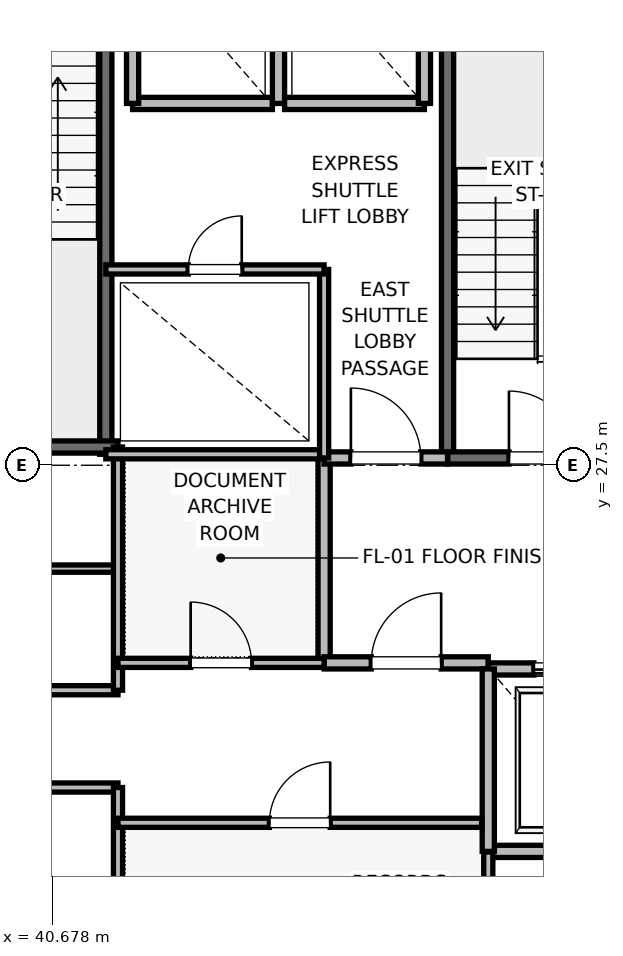
"""IFC4 building model, lengths in metres.
Left out: names, types, materials, properties, quantities, classifications, styles, units other than length and angle.
Written with IfcOpenShell. Run it as: python <this file> out.ifc"""

import sys

from ifc_helpers import new_model, si_unit, direction, frame, frame_2d, origin, place, context, subcontext, project, spatial, rectangle, extrude, element, fill, save


model = new_model("IFC4")
c1 = context("Model", 3, precision=1e-05, world=origin(), true_north=direction((0.0, 1.0)))
c2 = subcontext(c1, "Body", "Model", "MODEL_VIEW")
j1 = project(units=[si_unit("LENGTHUNIT", "METRE"), si_unit("PLANEANGLEUNIT", "RADIAN")], contexts=[c1])
p1 = place(None, origin())
s1 = spatial("IfcSite", under=j1, at=p1, CompositionType="ELEMENT")
p2 = place(p1, origin())
s2 = spatial("IfcBuilding", under=s1, at=p2, CompositionType="ELEMENT")
p3 = place(p2, frame((0.0, 0.0, 55.6)))
s3 = spatial("IfcBuildingStorey", under=s2, at=p3, CompositionType="ELEMENT", Elevation=55.6)
p4 = place(p3, frame((47.18, 27.62, 0.0), z_axis=(0.0, 0.0, 1.0), x_axis=(0.0, 1.0, 0.0)))
e1 = element("IfcWall", 1, at=p4, inside=s3, PredefinedType="SOLIDWALL", context=c2, shape_type="SweptSolid", body=[
    extrude(rectangle(XDim=8.18, YDim=0.2, at=frame_2d((4.09, 0.0))), origin(), (0.0, 0.0, 1.0), 3.76),
])
p5 = place(p3, frame((47.18, 27.62, 0.0), z_axis=(0.0, 0.0, 1.0), x_axis=(1.0, 0.0, 0.0)))
e2 = element("IfcWall", 2, at=p5, inside=s3, PredefinedType="SOLIDWALL", context=c2, shape_type="SweptSolid", body=[
    extrude(rectangle(XDim=3.12, YDim=0.2, at=frame_2d((1.56, 0.0))), origin(), (0.0, 0.0, 1.0), 3.76),
])
p6 = place(p5, frame((1.01, 0.0, 0.0)))
e3 = element("IfcOpeningElement", 3, at=p6, cuts=e2, PredefinedType="OPENING", context=c2, shape_type="SweptSolid", body=[
    extrude(rectangle(XDim=1.1, YDim=2.15, at=frame_2d((0.55, 1.075))), frame((0.0, 0.1, 0.0), z_axis=(0.0, -1.0, 0.0), x_axis=(1.0, 0.0, 0.0)), (0.0, 0.0, 1.0), 0.2),
])
p7 = place(p3, frame((41.56, 27.68, 0.0), z_axis=(0.0, 0.0, 1.0), x_axis=(0.0, 1.0, 0.0)))
e4 = element("IfcWall", 4, at=p7, inside=s3, PredefinedType="SOLIDWALL", context=c2, shape_type="SweptSolid", body=[
    extrude(rectangle(XDim=8.57, YDim=0.2, at=frame_2d((4.285, 0.0))), origin(), (0.0, 0.0, 1.0), 3.76),
])
p8 = place(p3, frame((38.44, 27.8, 0.0), z_axis=(0.0, 0.0, 1.0), x_axis=(1.0, 0.0, 0.0)))
e5 = element("IfcWall", 5, at=p8, inside=s3, PredefinedType="SOLIDWALL", context=c2, shape_type="SweptSolid", body=[
    extrude(rectangle(XDim=3.32, YDim=0.2, at=frame_2d((1.66, 0.0))), origin(), (0.0, 0.0, 1.0), 3.76),
])
p9 = place(p3, frame((45.15, 24.25, 0.0), z_axis=(0.0, 0.0, 1.0), x_axis=(0.0, 1.0, 0.0)))
e6 = element("IfcWall", 6, at=p9, inside=s3, PredefinedType="PARTITIONING", context=c2, shape_type="SweptSolid", body=[
    extrude(rectangle(XDim=3.37, YDim=0.2, at=frame_2d((1.685, 0.0))), origin(), (0.0, 0.0, 1.0), 3.76),
])
p10 = place(p3, frame((45.15, 24.25, 0.0), z_axis=(0.0, 0.0, 1.0), x_axis=(1.0, 0.0, 0.0)))
e7 = element("IfcWall", 7, at=p10, inside=s3, PredefinedType="PARTITIONING", context=c2, shape_type="SweptSolid", body=[
    extrude(rectangle(XDim=2.7, YDim=0.2, at=frame_2d((1.35, 0.0))), origin(), (0.0, 0.0, 1.0), 3.76),
])
p11 = place(p10, frame((0.775, 0.0, 0.0)))
e8 = element("IfcOpeningElement", 8, at=p11, cuts=e7, PredefinedType="OPENING", context=c2, shape_type="SweptSolid", body=[
    extrude(rectangle(XDim=1.15, YDim=2.2, at=frame_2d((0.575, 1.1))), frame((0.0, 0.1, 0.0), z_axis=(0.0, -1.0, 0.0), x_axis=(1.0, 0.0, 0.0)), (0.0, 0.0, 1.0), 0.2),
])
p12 = place(p3, frame((45.15, 27.62, 0.0), z_axis=(0.0, 0.0, 1.0), x_axis=(1.0, 0.0, 0.0)))
e9 = element("IfcWall", 9, at=p12, inside=s3, PredefinedType="PARTITIONING", context=c2, shape_type="SweptSolid", body=[
    extrude(rectangle(XDim=2.03, YDim=0.2, at=frame_2d((1.015, 0.0))), origin(), (0.0, 0.0, 1.0), 3.76),
])
p13 = place(p12, frame((0.44, 0.0, 0.0)))
e10 = element("IfcOpeningElement", 10, at=p13, cuts=e9, PredefinedType="OPENING", context=c2, shape_type="SweptSolid", body=[
    extrude(rectangle(XDim=1.15, YDim=2.2, at=frame_2d((0.575, 1.1))), frame((0.0, 0.1, 0.0), z_axis=(0.0, -1.0, 0.0), x_axis=(1.0, 0.0, 0.0)), (0.0, 0.0, 1.0), 0.2),
])
p14 = place(p3, frame((47.85, 21.15, 0.0), z_axis=(0.0, 0.0, 1.0), x_axis=(1.0, 0.0, 0.0)))
e11 = element("IfcWall", 11, at=p14, inside=s3, PredefinedType="SOLIDWALL", context=c2, shape_type="SweptSolid", body=[
    extrude(rectangle(XDim=2.6, YDim=0.2, at=frame_2d((1.3, 0.0))), origin(), (0.0, 0.0, 1.0), 3.76),
])
p15 = place(p3, frame((50.45, 24.15, 0.0), z_axis=(0.0, 0.0, 1.0), x_axis=(-1.0, 0.0, 0.0)))
e12 = element("IfcWall", 12, at=p15, inside=s3, PredefinedType="SOLIDWALL", context=c2, shape_type="SweptSolid", body=[
    extrude(rectangle(XDim=2.6, YDim=0.2, at=frame_2d((1.3, 0.0))), origin(), (0.0, 0.0, 1.0), 2.54),
])
p16 = place(p15, frame((0.75, 0.0, 0.0)))
e13 = element("IfcOpeningElement", 13, at=p16, cuts=e12, PredefinedType="OPENING", context=c2, shape_type="SweptSolid", body=[
    extrude(rectangle(XDim=1.1, YDim=2.2, at=frame_2d((0.55, 1.1))), frame((0.0, 0.1, 0.0), z_axis=(0.0, -1.0, 0.0), x_axis=(1.0, 0.0, 0.0)), (0.0, 0.0, 1.0), 0.2),
])
p17 = place(p3, frame((47.85, 24.15, 0.0), z_axis=(0.0, 0.0, 1.0), x_axis=(0.0, -1.0, 0.0)))
e14 = element("IfcWall", 14, at=p17, inside=s3, PredefinedType="SOLIDWALL", context=c2, shape_type="SweptSolid", body=[
    extrude(rectangle(XDim=3.0, YDim=0.2, at=frame_2d((1.5, 0.0))), origin(), (0.0, 0.0, 1.0), 3.76),
])
p18 = place(p3, frame((42.0, 33.45, 0.0), z_axis=(0.0, 0.0, 1.0), x_axis=(1.0, 0.0, 0.0)))
e15 = element("IfcWall", 15, at=p18, inside=s3, PredefinedType="SOLIDWALL", context=c2, shape_type="SweptSolid", body=[
    extrude(rectangle(XDim=2.3, YDim=0.2, at=frame_2d((1.15, 0.0))), origin(), (0.0, 0.0, 1.0), 3.76),
])
for number, where, z_axis, x_axis in (
    (16, (42.0, 36.05, 0.0), (0.0, 0.0, 1.0), (0.0, -1.0, 0.0)),
    (17, (44.4, 33.45, 0.0), (0.0, 0.0, 1.0), (0.0, 1.0, 0.0)),
):
    element("IfcWall", number, at=place(p3, frame(where, z_axis=z_axis, x_axis=x_axis)), inside=s3, PredefinedType="SOLIDWALL", context=c2, shape_type="SweptSolid", body=[
        extrude(rectangle(XDim=2.6, YDim=0.2, at=frame_2d((1.3, 0.0))), origin(), (0.0, 0.0, 1.0), 2.54),
    ])
p19 = place(p3, frame((44.5, 33.45, 0.0), z_axis=(0.0, 0.0, 1.0), x_axis=(1.0, 0.0, 0.0)))
e18 = element("IfcWall", 18, at=p19, inside=s3, PredefinedType="SOLIDWALL", context=c2, shape_type="SweptSolid", body=[
    extrude(rectangle(XDim=2.3, YDim=0.2, at=frame_2d((1.15, 0.0))), origin(), (0.0, 0.0, 1.0), 3.76),
])
p20 = place(p3, frame((46.8, 33.45, 0.0), z_axis=(0.0, 0.0, 1.0), x_axis=(0.0, 1.0, 0.0)))
e19 = element("IfcWall", 19, at=p20, inside=s3, PredefinedType="SOLIDWALL", context=c2, shape_type="SweptSolid", body=[
    extrude(rectangle(XDim=2.6, YDim=0.2, at=frame_2d((1.3, 0.0))), origin(), (0.0, 0.0, 1.0), 3.76),
])
for number, where, z_axis, x_axis in (
    (20, (39.95, 22.2, 0.0), (0.0, 0.0, 1.0), (1.0, 0.0, 0.0)),
    (21, (39.95, 23.8, 0.0), (0.0, 0.0, 1.0), (1.0, 0.0, 0.0)),
):
    element("IfcWall", number, at=place(p3, frame(where, z_axis=z_axis, x_axis=x_axis)), inside=s3, PredefinedType="PARTITIONING", context=c2, shape_type="SweptSolid", body=[
        extrude(rectangle(XDim=1.81, YDim=0.15, at=frame_2d((0.905, 0.0))), origin(), (0.0, 0.0, 1.0), 2.85),
    ])
p21 = place(p3, frame((39.95, 25.8, 0.0), z_axis=(0.0, 0.0, 1.0), x_axis=(1.0, 0.0, 0.0)))
e22 = element("IfcWall", 22, at=p21, inside=s3, PredefinedType="PARTITIONING", context=c2, shape_type="SweptSolid", body=[
    extrude(rectangle(XDim=1.81, YDim=0.12, at=frame_2d((0.905, 0.0))), origin(), (0.0, 0.0, 1.0), 2.85),
])
p22 = place(p3, frame((41.76, 18.6, 0.0), z_axis=(0.0, 0.0, 1.0), x_axis=(0.0, 1.0, 0.0)))
e23 = element("IfcWall", 23, at=p22, inside=s3, PredefinedType="PARTITIONING", context=c2, shape_type="SweptSolid", body=[
    extrude(rectangle(XDim=3.6, YDim=0.15, at=frame_2d((1.8, 0.0))), origin(), (0.0, 0.0, 1.0), 2.54),
])
p23 = place(p3, frame((41.76, 23.8, 0.0), z_axis=(0.0, 0.0, 1.0), x_axis=(0.0, 1.0, 0.0)))
e24 = element("IfcWall", 24, at=p23, inside=s3, PredefinedType="PARTITIONING", context=c2, shape_type="SweptSolid", body=[
    extrude(rectangle(XDim=4.0, YDim=0.15, at=frame_2d((2.0, 0.0))), origin(), (0.0, 0.0, 1.0), 2.85),
])
p24 = place(p3, frame((41.56, 27.68, 0.0), z_axis=(0.0, 0.0, 1.0), x_axis=(1.0, 0.0, 0.0)))
e25 = element("IfcWall", 25, at=p24, inside=s3, PredefinedType="PARTITIONING", context=c2, shape_type="SweptSolid", body=[
    extrude(rectangle(XDim=3.59, YDim=0.15, at=frame_2d((1.795, 0.0))), origin(), (0.0, 0.0, 1.0), 2.85),
])
p25 = place(p3, frame((47.85, 18.6, 0.0), z_axis=(0.0, 0.0, 1.0), x_axis=(0.0, 1.0, 0.0)))
e26 = element("IfcWall", 26, at=p25, inside=s3, PredefinedType="PARTITIONING", context=c2, shape_type="SweptSolid", body=[
    extrude(rectangle(XDim=2.54, YDim=0.15, at=frame_2d((1.27, 0.0))), origin(), (0.0, 0.0, 1.0), 2.85),
])
p26 = place(p3, frame((41.76, 21.62, 0.0), z_axis=(0.0, 0.0, 1.0), x_axis=(1.0, 0.0, 0.0)))
e27 = element("IfcWall", 27, at=p26, inside=s3, PredefinedType="PARTITIONING", context=c2, shape_type="SweptSolid", body=[
    extrude(rectangle(XDim=5.98, YDim=0.15, at=frame_2d((2.99, 0.0))), origin(), (0.0, 0.0, 1.0), 2.85),
])
p27 = place(p26, frame((2.49, 0.0, 0.0)))
e28 = element("IfcOpeningElement", 28, at=p27, cuts=e27, PredefinedType="OPENING", context=c2, shape_type="SweptSolid", body=[
    extrude(rectangle(XDim=1.0, YDim=2.15, at=frame_2d((0.5, 1.075))), frame((0.0, 0.075, 0.0), z_axis=(0.0, -1.0, 0.0), x_axis=(1.0, 0.0, 0.0)), (0.0, 0.0, 1.0), 0.15),
])
p28 = place(p3, frame((41.76, 24.25, 0.0), z_axis=(0.0, 0.0, 1.0), x_axis=(1.0, 0.0, 0.0)))
e29 = element("IfcWall", 29, at=p28, inside=s3, PredefinedType="PARTITIONING", context=c2, shape_type="SweptSolid", body=[
    extrude(rectangle(XDim=3.39, YDim=0.15, at=frame_2d((1.695, 0.0))), origin(), (0.0, 0.0, 1.0), 2.85),
])
p29 = place(p28, frame((1.195, 0.0, 0.0)))
e30 = element("IfcOpeningElement", 30, at=p29, cuts=e29, PredefinedType="OPENING", context=c2, shape_type="SweptSolid", body=[
    extrude(rectangle(XDim=1.0, YDim=2.15, at=frame_2d((0.5, 1.075))), frame((0.0, 0.075, 0.0), z_axis=(0.0, -1.0, 0.0), x_axis=(1.0, 0.0, 0.0)), (0.0, 0.0, 1.0), 0.15),
])
p30 = place(p3, frame((45.15, 27.62, 0.0), z_axis=(0.0, 0.0, 1.0), x_axis=(0.0, 1.0, 0.0)))
e31 = element("IfcWall", 31, at=p30, inside=s3, PredefinedType="PARTITIONING", context=c2, shape_type="SweptSolid", body=[
    extrude(rectangle(XDim=3.1, YDim=0.15, at=frame_2d((1.55, 0.0))), origin(), (0.0, 0.0, 1.0), 2.85),
])
p31 = place(p3, frame((41.56, 30.72, 0.0), z_axis=(0.0, 0.0, 1.0), x_axis=(1.0, 0.0, 0.0)))
e32 = element("IfcWall", 32, at=p31, inside=s3, PredefinedType="PARTITIONING", context=c2, shape_type="SweptSolid", body=[
    extrude(rectangle(XDim=3.59, YDim=0.15, at=frame_2d((1.795, 0.0))), origin(), (0.0, 0.0, 1.0), 2.85),
])
p32 = place(p31, frame((1.355, 0.0, 0.0)))
e33 = element("IfcOpeningElement", 33, at=p32, cuts=e32, PredefinedType="OPENING", context=c2, shape_type="SweptSolid", body=[
    extrude(rectangle(XDim=0.88, YDim=2.1, at=frame_2d((0.44, 1.05))), frame((0.0, 0.075, 0.0), z_axis=(0.0, -1.0, 0.0), x_axis=(1.0, 0.0, 0.0)), (0.0, 0.0, 1.0), 0.15),
])
p33 = place(p6, origin())
e34 = element("IfcDoor", 34, at=p33, inside=s3, OperationType="SINGLE_SWING_LEFT", PredefinedType="DOOR", context=c2, shape_type="SweptSolid", body=[
    extrude(rectangle(XDim=1.1, YDim=2.15, at=frame_2d((0.55, 1.075))), frame((0.0, 0.025, 0.0), z_axis=(0.0, -1.0, 0.0), x_axis=(1.0, 0.0, 0.0)), (0.0, 0.0, 1.0), 0.05),
])
fill(e3, e34)
p34 = place(p11, origin())
e35 = element("IfcDoor", 35, at=p34, inside=s3, OperationType="SINGLE_SWING_RIGHT", PredefinedType="DOOR", context=c2, shape_type="SweptSolid", body=[
    extrude(rectangle(XDim=1.15, YDim=2.2, at=frame_2d((0.575, 1.1))), frame((0.0, 0.025, 0.0), z_axis=(0.0, -1.0, 0.0), x_axis=(1.0, 0.0, 0.0)), (0.0, 0.0, 1.0), 0.05),
])
fill(e8, e35)
p35 = place(p13, origin())
e36 = element("IfcDoor", 36, at=p35, inside=s3, OperationType="SINGLE_SWING_LEFT", PredefinedType="DOOR", context=c2, shape_type="SweptSolid", body=[
    extrude(rectangle(XDim=1.15, YDim=2.2, at=frame_2d((0.575, 1.1))), frame((0.0, 0.025, 0.0), z_axis=(0.0, -1.0, 0.0), x_axis=(1.0, 0.0, 0.0)), (0.0, 0.0, 1.0), 0.05),
])
fill(e10, e36)
p36 = place(p16, origin())
e37 = element("IfcDoor", 37, at=p36, inside=s3, OperationType="SLIDING_TO_RIGHT", PredefinedType="DOOR", context=c2, shape_type="SweptSolid", body=[
    extrude(rectangle(XDim=1.1, YDim=2.2, at=frame_2d((0.55, 1.1))), frame((0.0, 0.025, 0.0), z_axis=(0.0, -1.0, 0.0), x_axis=(1.0, 0.0, 0.0)), (0.0, 0.0, 1.0), 0.05),
])
fill(e13, e37)
p37 = place(p27, origin())
e38 = element("IfcDoor", 38, at=p37, inside=s3, OperationType="SINGLE_SWING_RIGHT", PredefinedType="DOOR", context=c2, shape_type="SweptSolid", body=[
    extrude(rectangle(XDim=1.0, YDim=2.15, at=frame_2d((0.5, 1.075))), frame((0.0, 0.025, 0.0), z_axis=(0.0, -1.0, 0.0), x_axis=(1.0, 0.0, 0.0)), (0.0, 0.0, 1.0), 0.05),
])
fill(e28, e38)
p38 = place(p29, origin())
e39 = element("IfcDoor", 39, at=p38, inside=s3, OperationType="SINGLE_SWING_LEFT", PredefinedType="DOOR", context=c2, shape_type="SweptSolid", body=[
    extrude(rectangle(XDim=1.0, YDim=2.15, at=frame_2d((0.5, 1.075))), frame((0.0, 0.025, 0.0), z_axis=(0.0, -1.0, 0.0), x_axis=(1.0, 0.0, 0.0)), (0.0, 0.0, 1.0), 0.05),
])
fill(e30, e39)
p39 = place(p32, origin())
e40 = element("IfcDoor", 40, at=p39, inside=s3, OperationType="SINGLE_SWING_RIGHT", PredefinedType="DOOR", context=c2, shape_type="SweptSolid", body=[
    extrude(rectangle(XDim=0.88, YDim=2.1, at=frame_2d((0.44, 1.05))), frame((0.0, 0.025, 0.0), z_axis=(0.0, -1.0, 0.0), x_axis=(1.0, 0.0, 0.0)), (0.0, 0.0, 1.0), 0.05),
])
fill(e33, e40)
save(model, sys.argv[1])
